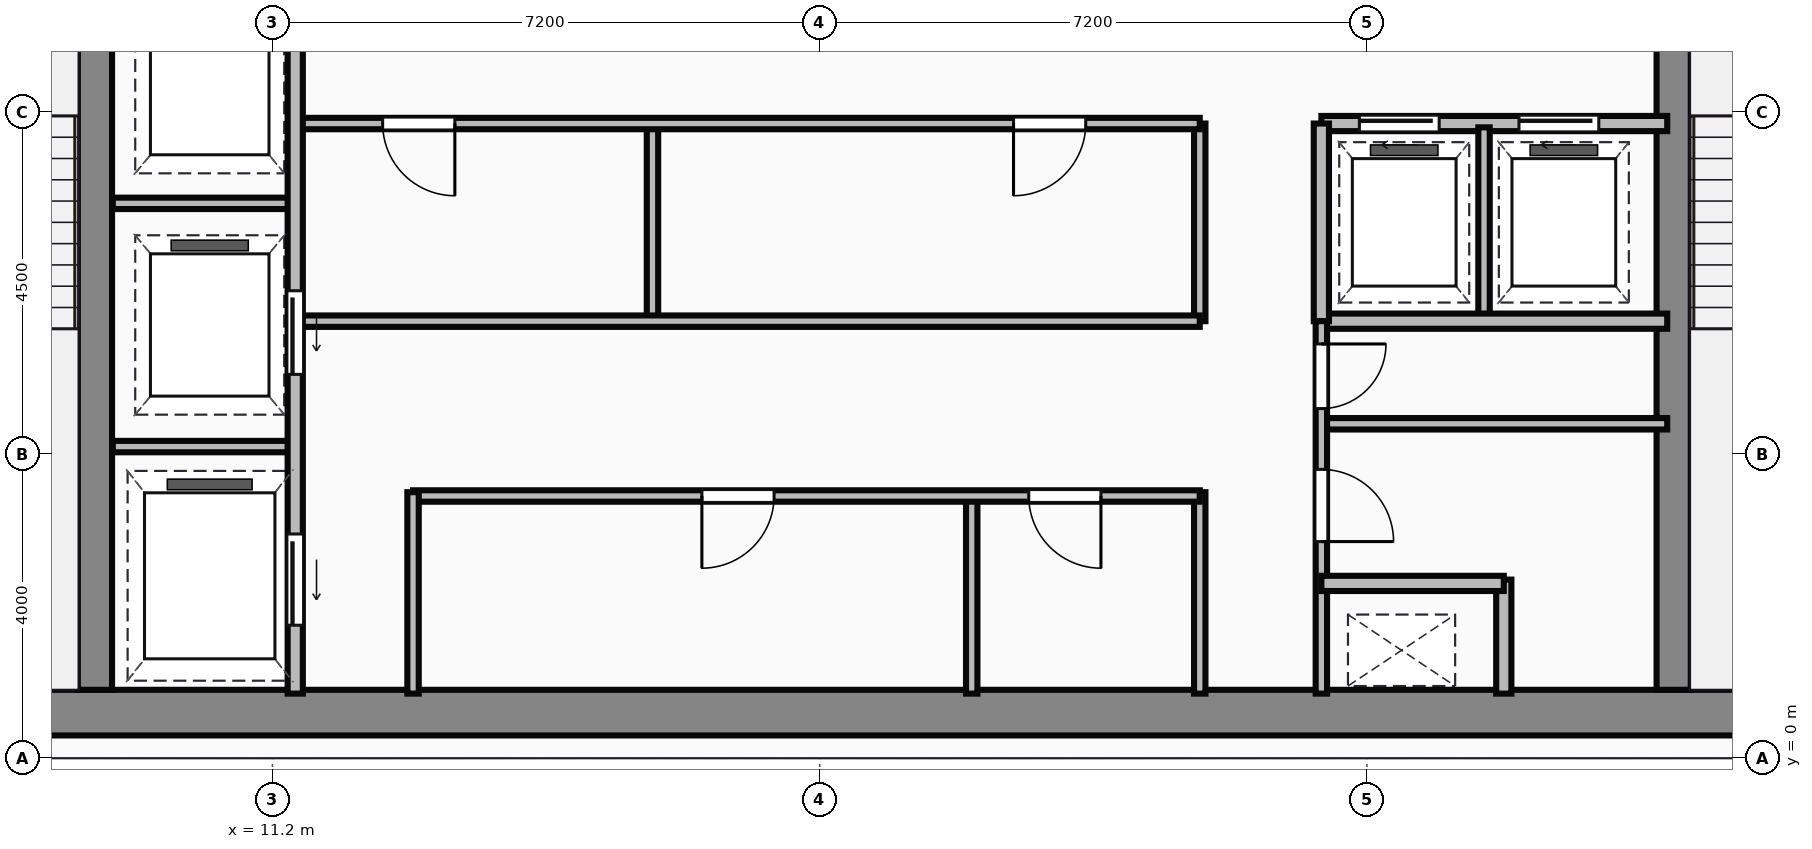
"""IFC4 building model, lengths in metres.
Left out: names, types, materials, properties, quantities, classifications, styles, units other than length and angle.
Written with IfcOpenShell. Run it as: python <this file> out.ifc"""

import sys

from ifc_helpers import new_model, si_unit, direction, frame, frame_2d, origin, place, context, subcontext, project, spatial, rectangle, extrude, source, transform, mapped, element, fill, save


model = new_model("IFC4")
c1 = context("Model", 3, precision=1e-05, world=origin(), true_north=direction((0.0, 1.0)))
c2 = subcontext(c1, "Body", "Model", "MODEL_VIEW")
j1 = project(units=[si_unit("LENGTHUNIT", "METRE"), si_unit("PLANEANGLEUNIT", "RADIAN")], contexts=[c1])
p1 = place(None, origin())
s1 = spatial("IfcSite", under=j1, at=p1, CompositionType="ELEMENT")
p2 = place(p1, origin())
s2 = spatial("IfcBuilding", under=s1, at=p2, CompositionType="ELEMENT")
p3 = place(p2, frame((0.0, 0.0, 247.85)))
s3 = spatial("IfcBuildingStorey", under=s2, at=p3, CompositionType="ELEMENT", Elevation=247.85)
m1 = source(origin(), c2, "Body", "SweptSolid", [
    extrude(rectangle(XDim=29.5, YDim=0.6, at=frame_2d((14.75, 0.0))), origin(), (0.0, 0.0, 1.0), 3.65),
])
p4 = place(p3, frame((4.5, 0.6, 0.0), z_axis=(0.0, 0.0, 1.0), x_axis=(1.0, 0.0, 0.0)))
e1 = element("IfcWall", 1, at=p4, inside=s3, PredefinedType="SHEAR", context=c2, shape_type="MappedRepresentation", body=[
    mapped(m1, transform((0.0, 0.0, 0.0))),
])
m2 = source(origin(), c2, "Body", "SweptSolid", [
    extrude(rectangle(XDim=12.5, YDim=0.45, at=frame_2d((6.25, 0.0))), origin(), (0.0, 0.0, 1.0), 3.65),
])
for number, where, z_axis, x_axis in (
    (2, (8.865, 0.9, 0.0), (0.0, 0.0, 1.0), (0.0, 1.0, 0.0)),
    (3, (29.635, 0.9, 0.0), (0.0, 0.0, 1.0), (0.0, 1.0, 0.0)),
):
    element("IfcWall", number, at=place(p3, frame(where, z_axis=z_axis, x_axis=x_axis)), inside=s3, PredefinedType="SHEAR", context=c2, shape_type="MappedRepresentation", body=[
        mapped(m2, transform((0.0, 0.0, 0.0))),
    ])
m3 = source(origin(), c2, "Body", "SweptSolid", [
    extrude(rectangle(XDim=9.6, YDim=0.2, at=frame_2d((4.8, 0.0))), origin(), (0.0, 0.0, 1.0), 3.4),
])
p5 = place(p3, frame((11.5, 0.85, 0.0), z_axis=(0.0, 0.0, 1.0), x_axis=(0.0, 1.0, 0.0)))
e4 = element("IfcWall", 4, at=p5, inside=s3, PredefinedType="PARTITIONING", context=c2, shape_type="MappedRepresentation", body=[
    mapped(m3, transform((0.0, 0.0, 0.0))),
])
p6 = place(p5, frame((4.2, 0.0, 0.0)))
e5 = element("IfcOpeningElement", 5, at=p6, cuts=e4, PredefinedType="OPENING", context=c2, shape_type="SweptSolid", body=[
    extrude(rectangle(XDim=1.1, YDim=2.15, at=frame_2d((0.55, 1.075))), frame((0.0, 0.11, 0.0), z_axis=(0.0, -1.0, 0.0), x_axis=(1.0, 0.0, 0.0)), (0.0, 0.0, 1.0), 0.22),
])
p7 = place(p5, frame((0.9, 0.0, 0.0)))
e6 = element("IfcOpeningElement", 6, at=p7, cuts=e4, PredefinedType="OPENING", context=c2, shape_type="SweptSolid", body=[
    extrude(rectangle(XDim=1.2, YDim=2.15, at=frame_2d((0.6, 1.075))), frame((0.0, 0.11, 0.0), z_axis=(0.0, -1.0, 0.0), x_axis=(1.0, 0.0, 0.0)), (0.0, 0.0, 1.0), 0.22),
])
m4 = source(origin(), c2, "Body", "SweptSolid", [
    extrude(rectangle(XDim=2.4, YDim=0.15, at=frame_2d((1.2, 0.0))), origin(), (0.0, 0.0, 1.0), 3.4),
])
for number, where, z_axis, x_axis in (
    (7, (9.1, 4.1, 0.0), (0.0, 0.0, 1.0), (1.0, 0.0, 0.0)),
    (8, (9.1, 7.3, 0.0), (0.0, 0.0, 1.0), (1.0, 0.0, 0.0)),
):
    element("IfcWall", number, at=place(p3, frame(where, z_axis=z_axis, x_axis=x_axis)), inside=s3, PredefinedType="PARTITIONING", context=c2, shape_type="MappedRepresentation", body=[
        mapped(m4, transform((0.0, 0.0, 0.0))),
    ])
m5 = source(origin(), c2, "Body", "SweptSolid", [
    extrude(rectangle(XDim=2.65, YDim=0.15, at=frame_2d((1.325, 0.0))), origin(), (0.0, 0.0, 1.0), 3.4),
])
p8 = place(p3, frame((13.05, 0.85, 0.0), z_axis=(0.0, 0.0, 1.0), x_axis=(0.0, 1.0, 0.0)))
e9 = element("IfcWall", 9, at=p8, inside=s3, PredefinedType="PARTITIONING", context=c2, shape_type="MappedRepresentation", body=[
    mapped(m5, transform((0.0, 0.0, 0.0))),
])
m6 = source(origin(), c2, "Body", "SweptSolid", [
    extrude(rectangle(XDim=10.35, YDim=0.15, at=frame_2d((5.175, 0.0))), origin(), (0.0, 0.0, 1.0), 3.4),
])
p9 = place(p3, frame((13.05, 3.45, 0.0), z_axis=(0.0, 0.0, 1.0), x_axis=(1.0, 0.0, 0.0)))
e10 = element("IfcWall", 10, at=p9, inside=s3, PredefinedType="PARTITIONING", context=c2, shape_type="MappedRepresentation", body=[
    mapped(m6, transform((0.0, 0.0, 0.0))),
])
p10 = place(p9, frame((3.8, 0.0, 0.0)))
e11 = element("IfcOpeningElement", 11, at=p10, cuts=e10, PredefinedType="OPENING", context=c2, shape_type="SweptSolid", body=[
    extrude(rectangle(XDim=0.95, YDim=2.15, at=frame_2d((0.475, 1.075))), frame((0.0, 0.085, 0.0), z_axis=(0.0, -1.0, 0.0), x_axis=(1.0, 0.0, 0.0)), (0.0, 0.0, 1.0), 0.17),
])
p11 = place(p9, frame((8.1, 0.0, 0.0)))
e12 = element("IfcOpeningElement", 12, at=p11, cuts=e10, PredefinedType="OPENING", context=c2, shape_type="SweptSolid", body=[
    extrude(rectangle(XDim=0.95, YDim=2.15, at=frame_2d((0.475, 1.075))), frame((0.0, 0.085, 0.0), z_axis=(0.0, -1.0, 0.0), x_axis=(1.0, 0.0, 0.0)), (0.0, 0.0, 1.0), 0.17),
])
p12 = place(p3, frame((23.4, 0.85, 0.0), z_axis=(0.0, 0.0, 1.0), x_axis=(0.0, 1.0, 0.0)))
e13 = element("IfcWall", 13, at=p12, inside=s3, PredefinedType="PARTITIONING", context=c2, shape_type="MappedRepresentation", body=[
    mapped(m5, transform((0.0, 0.0, 0.0))),
])
m7 = source(origin(), c2, "Body", "SweptSolid", [
    extrude(rectangle(XDim=2.6, YDim=0.15, at=frame_2d((1.3, 0.0))), origin(), (0.0, 0.0, 1.0), 3.4),
])
p13 = place(p3, frame((20.4, 0.85, 0.0), z_axis=(0.0, 0.0, 1.0), x_axis=(0.0, 1.0, 0.0)))
e14 = element("IfcWall", 14, at=p13, inside=s3, PredefinedType="PARTITIONING", context=c2, shape_type="MappedRepresentation", body=[
    mapped(m7, transform((0.0, 0.0, 0.0))),
])
m8 = source(origin(), c2, "Body", "SweptSolid", [
    extrude(rectangle(XDim=11.85, YDim=0.15, at=frame_2d((5.925, 0.0))), origin(), (0.0, 0.0, 1.0), 3.4),
])
p14 = place(p3, frame((11.55, 5.75, 0.0), z_axis=(0.0, 0.0, 1.0), x_axis=(1.0, 0.0, 0.0)))
e15 = element("IfcWall", 15, at=p14, inside=s3, PredefinedType="PARTITIONING", context=c2, shape_type="MappedRepresentation", body=[
    mapped(m8, transform((0.0, 0.0, 0.0))),
])
p15 = place(p3, frame((11.55, 8.35, 0.0), z_axis=(0.0, 0.0, 1.0), x_axis=(1.0, 0.0, 0.0)))
e16 = element("IfcWall", 16, at=p15, inside=s3, PredefinedType="PARTITIONING", context=c2, shape_type="MappedRepresentation", body=[
    mapped(m8, transform((0.0, 0.0, 0.0))),
])
p16 = place(p15, frame((1.1, 0.0, 0.0)))
e17 = element("IfcOpeningElement", 17, at=p16, cuts=e16, PredefinedType="OPENING", context=c2, shape_type="SweptSolid", body=[
    extrude(rectangle(XDim=0.95, YDim=2.15, at=frame_2d((0.475, 1.075))), frame((0.0, 0.085, 0.0), z_axis=(0.0, -1.0, 0.0), x_axis=(1.0, 0.0, 0.0)), (0.0, 0.0, 1.0), 0.17),
])
p17 = place(p15, frame((9.4, 0.0, 0.0)))
e18 = element("IfcOpeningElement", 18, at=p17, cuts=e16, PredefinedType="OPENING", context=c2, shape_type="SweptSolid", body=[
    extrude(rectangle(XDim=0.95, YDim=2.15, at=frame_2d((0.475, 1.075))), frame((0.0, 0.085, 0.0), z_axis=(0.0, -1.0, 0.0), x_axis=(1.0, 0.0, 0.0)), (0.0, 0.0, 1.0), 0.17),
])
m9 = source(origin(), c2, "Body", "SweptSolid", [
    extrude(rectangle(XDim=2.6, YDim=0.15, at=frame_2d((1.3, 0.0))), origin(), (0.0, 0.0, 1.0), 3.4),
])
p18 = place(p3, frame((23.4, 5.75, 0.0), z_axis=(0.0, 0.0, 1.0), x_axis=(0.0, 1.0, 0.0)))
e19 = element("IfcWall", 19, at=p18, inside=s3, PredefinedType="PARTITIONING", context=c2, shape_type="MappedRepresentation", body=[
    mapped(m9, transform((0.0, 0.0, 0.0))),
])
m10 = source(origin(), c2, "Body", "SweptSolid", [
    extrude(rectangle(XDim=2.5, YDim=0.15, at=frame_2d((1.25, 0.0))), origin(), (0.0, 0.0, 1.0), 3.4),
])
p19 = place(p3, frame((16.2, 5.8, 0.0), z_axis=(0.0, 0.0, 1.0), x_axis=(0.0, 1.0, 0.0)))
e20 = element("IfcWall", 20, at=p19, inside=s3, PredefinedType="PARTITIONING", context=c2, shape_type="MappedRepresentation", body=[
    mapped(m10, transform((0.0, 0.0, 0.0))),
])
m11 = source(origin(), c2, "Body", "SweptSolid", [
    extrude(rectangle(XDim=4.55, YDim=0.2, at=frame_2d((2.275, 0.0))), origin(), (0.0, 0.0, 1.0), 3.4),
])
p20 = place(p3, frame((25.0, 8.35, 0.0), z_axis=(0.0, 0.0, 1.0), x_axis=(1.0, 0.0, 0.0)))
e21 = element("IfcWall", 21, at=p20, inside=s3, PredefinedType="PARTITIONING", context=c2, shape_type="MappedRepresentation", body=[
    mapped(m11, transform((0.0, 0.0, 0.0))),
])
p21 = place(p20, frame((0.5, 0.0, 0.0)))
e22 = element("IfcOpeningElement", 22, at=p21, cuts=e21, PredefinedType="OPENING", context=c2, shape_type="SweptSolid", body=[
    extrude(rectangle(XDim=1.05, YDim=2.15, at=frame_2d((0.525, 1.075))), frame((0.0, 0.11, 0.0), z_axis=(0.0, -1.0, 0.0), x_axis=(1.0, 0.0, 0.0)), (0.0, 0.0, 1.0), 0.22),
])
p22 = place(p20, frame((2.6, 0.0, 0.0)))
e23 = element("IfcOpeningElement", 23, at=p22, cuts=e21, PredefinedType="OPENING", context=c2, shape_type="SweptSolid", body=[
    extrude(rectangle(XDim=1.05, YDim=2.15, at=frame_2d((0.525, 1.075))), frame((0.0, 0.11, 0.0), z_axis=(0.0, -1.0, 0.0), x_axis=(1.0, 0.0, 0.0)), (0.0, 0.0, 1.0), 0.22),
])
p23 = place(p3, frame((25.0, 5.75, 0.0), z_axis=(0.0, 0.0, 1.0), x_axis=(1.0, 0.0, 0.0)))
e24 = element("IfcWall", 24, at=p23, inside=s3, PredefinedType="PARTITIONING", context=c2, shape_type="MappedRepresentation", body=[
    mapped(m11, transform((0.0, 0.0, 0.0))),
])
m12 = source(origin(), c2, "Body", "SweptSolid", [
    extrude(rectangle(XDim=2.6, YDim=0.2, at=frame_2d((1.3, 0.0))), origin(), (0.0, 0.0, 1.0), 3.4),
])
p24 = place(p3, frame((25.0, 5.75, 0.0), z_axis=(0.0, 0.0, 1.0), x_axis=(0.0, 1.0, 0.0)))
e25 = element("IfcWall", 25, at=p24, inside=s3, PredefinedType="PARTITIONING", context=c2, shape_type="MappedRepresentation", body=[
    mapped(m12, transform((0.0, 0.0, 0.0))),
])
p25 = place(p3, frame((27.14, 5.8, 0.0), z_axis=(0.0, 0.0, 1.0), x_axis=(0.0, 1.0, 0.0)))
e26 = element("IfcWall", 26, at=p25, inside=s3, PredefinedType="PARTITIONING", context=c2, shape_type="MappedRepresentation", body=[
    mapped(m10, transform((0.0, 0.0, 0.0))),
])
m13 = source(origin(), c2, "Body", "SweptSolid", [
    extrude(rectangle(XDim=4.9, YDim=0.15, at=frame_2d((2.45, 0.0))), origin(), (0.0, 0.0, 1.0), 3.4),
])
p26 = place(p3, frame((25.0, 0.85, 0.0), z_axis=(0.0, 0.0, 1.0), x_axis=(0.0, 1.0, 0.0)))
e27 = element("IfcWall", 27, at=p26, inside=s3, PredefinedType="PARTITIONING", context=c2, shape_type="MappedRepresentation", body=[
    mapped(m13, transform((0.0, 0.0, 0.0))),
])
p27 = place(p26, frame((2.0, 0.0, 0.0)))
e28 = element("IfcOpeningElement", 28, at=p27, cuts=e27, PredefinedType="OPENING", context=c2, shape_type="SweptSolid", body=[
    extrude(rectangle(XDim=0.95, YDim=2.15, at=frame_2d((0.475, 1.075))), frame((0.0, 0.085, 0.0), z_axis=(0.0, -1.0, 0.0), x_axis=(1.0, 0.0, 0.0)), (0.0, 0.0, 1.0), 0.17),
])
p28 = place(p26, frame((3.75, 0.0, 0.0)))
e29 = element("IfcOpeningElement", 29, at=p28, cuts=e27, PredefinedType="OPENING", context=c2, shape_type="SweptSolid", body=[
    extrude(rectangle(XDim=0.85, YDim=2.15, at=frame_2d((0.425, 1.075))), frame((0.0, 0.085, 0.0), z_axis=(0.0, -1.0, 0.0), x_axis=(1.0, 0.0, 0.0)), (0.0, 0.0, 1.0), 0.17),
])
m14 = source(origin(), c2, "Body", "SweptSolid", [
    extrude(rectangle(XDim=2.4, YDim=0.2, at=frame_2d((1.2, 0.0))), origin(), (0.0, 0.0, 1.0), 3.4),
])
p29 = place(p3, frame((25.0, 2.3, 0.0), z_axis=(0.0, 0.0, 1.0), x_axis=(1.0, 0.0, 0.0)))
e30 = element("IfcWall", 30, at=p29, inside=s3, PredefinedType="PARTITIONING", context=c2, shape_type="MappedRepresentation", body=[
    mapped(m14, transform((0.0, 0.0, 0.0))),
])
m15 = source(origin(), c2, "Body", "SweptSolid", [
    extrude(rectangle(XDim=1.5, YDim=0.2, at=frame_2d((0.75, 0.0))), origin(), (0.0, 0.0, 1.0), 3.4),
])
p30 = place(p3, frame((27.4, 0.85, 0.0), z_axis=(0.0, 0.0, 1.0), x_axis=(0.0, 1.0, 0.0)))
e31 = element("IfcWall", 31, at=p30, inside=s3, PredefinedType="PARTITIONING", context=c2, shape_type="MappedRepresentation", body=[
    mapped(m15, transform((0.0, 0.0, 0.0))),
])
m16 = source(origin(), c2, "Body", "SweptSolid", [
    extrude(rectangle(XDim=4.55, YDim=0.15, at=frame_2d((2.275, 0.0))), origin(), (0.0, 0.0, 1.0), 3.4),
])
p31 = place(p3, frame((25.0, 4.4, 0.0), z_axis=(0.0, 0.0, 1.0), x_axis=(1.0, 0.0, 0.0)))
e32 = element("IfcWall", 32, at=p31, inside=s3, PredefinedType="PARTITIONING", context=c2, shape_type="MappedRepresentation", body=[
    mapped(m16, transform((0.0, 0.0, 0.0))),
])
m17 = source(origin(), c2, "Body", "SweptSolid", [
    extrude(rectangle(XDim=1.1, YDim=2.15, at=frame_2d((0.55, 1.075))), frame((0.0, 0.025, 0.0), z_axis=(0.0, -1.0, 0.0), x_axis=(1.0, 0.0, 0.0)), (0.0, 0.0, 1.0), 0.05),
])
p32 = place(p6, frame((1.1, 0.0, 0.0), z_axis=(0.0, 0.0, 1.0), x_axis=(-1.0, 0.0, 0.0)))
e33 = element("IfcDoor", 33, at=p32, inside=s3, OperationType="SLIDING_TO_LEFT", PredefinedType="DOOR", context=c2, shape_type="MappedRepresentation", body=[
    mapped(m17, transform((0.0, 0.0, 0.0))),
])
fill(e5, e33)
m18 = source(origin(), c2, "Body", "SweptSolid", [
    extrude(rectangle(XDim=1.2, YDim=2.15, at=frame_2d((0.6, 1.075))), frame((0.0, 0.025, 0.0), z_axis=(0.0, -1.0, 0.0), x_axis=(1.0, 0.0, 0.0)), (0.0, 0.0, 1.0), 0.05),
])
p33 = place(p7, frame((1.2, 0.0, 0.0), z_axis=(0.0, 0.0, 1.0), x_axis=(-1.0, 0.0, 0.0)))
e34 = element("IfcDoor", 34, at=p33, inside=s3, OperationType="SLIDING_TO_LEFT", PredefinedType="DOOR", context=c2, shape_type="MappedRepresentation", body=[
    mapped(m18, transform((0.0, 0.0, 0.0))),
])
fill(e6, e34)
m19 = source(origin(), c2, "Body", "SweptSolid", [
    extrude(rectangle(XDim=0.95, YDim=2.15, at=frame_2d((0.475, 1.075))), frame((0.0, 0.025, 0.0), z_axis=(0.0, -1.0, 0.0), x_axis=(1.0, 0.0, 0.0)), (0.0, 0.0, 1.0), 0.05),
])
p34 = place(p10, origin())
e35 = element("IfcDoor", 35, at=p34, inside=s3, OperationType="SINGLE_SWING_LEFT", PredefinedType="DOOR", context=c2, shape_type="MappedRepresentation", body=[
    mapped(m19, transform((0.0, 0.0, 0.0))),
])
fill(e11, e35)
p35 = place(p11, origin())
e36 = element("IfcDoor", 36, at=p35, inside=s3, OperationType="SINGLE_SWING_RIGHT", PredefinedType="DOOR", context=c2, shape_type="MappedRepresentation", body=[
    mapped(m19, transform((0.0, 0.0, 0.0))),
])
fill(e12, e36)
p36 = place(p16, origin())
e37 = element("IfcDoor", 37, at=p36, inside=s3, OperationType="SINGLE_SWING_RIGHT", PredefinedType="DOOR", context=c2, shape_type="MappedRepresentation", body=[
    mapped(m19, transform((0.0, 0.0, 0.0))),
])
fill(e17, e37)
p37 = place(p17, origin())
e38 = element("IfcDoor", 38, at=p37, inside=s3, OperationType="SINGLE_SWING_LEFT", PredefinedType="DOOR", context=c2, shape_type="MappedRepresentation", body=[
    mapped(m19, transform((0.0, 0.0, 0.0))),
])
fill(e18, e38)
m20 = source(origin(), c2, "Body", "SweptSolid", [
    extrude(rectangle(XDim=1.05, YDim=2.15, at=frame_2d((0.525, 1.075))), frame((0.0, 0.025, 0.0), z_axis=(0.0, -1.0, 0.0), x_axis=(1.0, 0.0, 0.0)), (0.0, 0.0, 1.0), 0.05),
])
p38 = place(p21, origin())
e39 = element("IfcDoor", 39, at=p38, inside=s3, OperationType="SLIDING_TO_LEFT", PredefinedType="DOOR", context=c2, shape_type="MappedRepresentation", body=[
    mapped(m20, transform((0.0, 0.0, 0.0))),
])
fill(e22, e39)
p39 = place(p22, origin())
e40 = element("IfcDoor", 40, at=p39, inside=s3, OperationType="SLIDING_TO_LEFT", PredefinedType="DOOR", context=c2, shape_type="MappedRepresentation", body=[
    mapped(m20, transform((0.0, 0.0, 0.0))),
])
fill(e23, e40)
p40 = place(p27, origin())
e41 = element("IfcDoor", 41, at=p40, inside=s3, OperationType="SINGLE_SWING_LEFT", PredefinedType="DOOR", context=c2, shape_type="MappedRepresentation", body=[
    mapped(m19, transform((0.0, 0.0, 0.0))),
])
fill(e28, e41)
m21 = source(origin(), c2, "Body", "SweptSolid", [
    extrude(rectangle(XDim=0.85, YDim=2.15, at=frame_2d((0.425, 1.075))), frame((0.0, 0.025, 0.0), z_axis=(0.0, -1.0, 0.0), x_axis=(1.0, 0.0, 0.0)), (0.0, 0.0, 1.0), 0.05),
])
p41 = place(p28, origin())
e42 = element("IfcDoor", 42, at=p41, inside=s3, OperationType="SINGLE_SWING_RIGHT", PredefinedType="DOOR", context=c2, shape_type="MappedRepresentation", body=[
    mapped(m21, transform((0.0, 0.0, 0.0))),
])
fill(e29, e42)
save(model, sys.argv[1])
